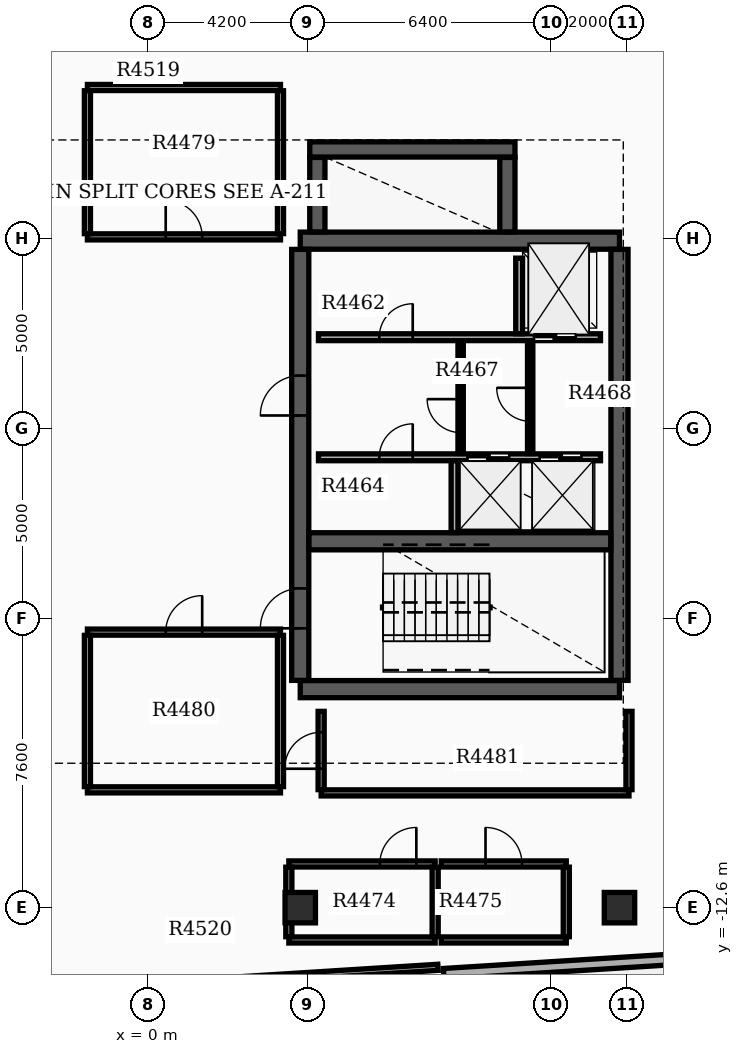
"""IFC4 building model, lengths in metres.
Left out: names, types, materials, properties, quantities, classifications, styles, units other than length and angle.
Written with IfcOpenShell. Run it as: python <this file> out.ifc"""

import sys

from ifc_helpers import new_model, si_unit, direction, frame, frame_2d, origin, origin_2d, place, context, subcontext, project, spatial, rectangle, extrude, element, fill, save


model = new_model("IFC4")
c1 = context("Model", 3, precision=1e-05, world=origin(), true_north=direction((0.0, 1.0)))
c2 = subcontext(c1, "Body", "Model", "MODEL_VIEW")
j1 = project(units=[si_unit("LENGTHUNIT", "METRE"), si_unit("PLANEANGLEUNIT", "RADIAN")], contexts=[c1])
p1 = place(None, origin())
s1 = spatial("IfcSite", under=j1, at=p1, CompositionType="ELEMENT")
p2 = place(p1, origin())
s2 = spatial("IfcBuilding", under=s1, at=p2, CompositionType="ELEMENT")
p3 = place(p2, frame((0.0, 0.0, 281.1)))
s3 = spatial("IfcBuildingStorey", under=s2, at=p3, CompositionType="ELEMENT", Elevation=281.1)
for number, where, z_axis, x_axis in (
    (1, (4.0, -6.85, 0.0), (0.0, 0.0, 1.0), (1.0, 0.0, 0.0)),
    (2, (4.0, 4.95, 0.0), (0.0, 0.0, 1.0), (1.0, 0.0, 0.0)),
):
    element("IfcWall", number, at=place(p3, frame(where, z_axis=z_axis, x_axis=x_axis)), inside=s3, PredefinedType="SHEAR", context=c2, shape_type="SweptSolid", body=[
        extrude(rectangle(XDim=8.4, YDim=0.45, at=frame_2d((4.2, 0.0))), origin(), (0.0, 0.0, 1.0), 3.7),
    ])
p4 = place(p3, frame((4.0, -6.62, 0.0), z_axis=(0.0, 0.0, 1.0), x_axis=(0.0, 1.0, 0.0)))
e3 = element("IfcWall", 3, at=p4, inside=s3, PredefinedType="SHEAR", context=c2, shape_type="SweptSolid", body=[
    extrude(rectangle(XDim=11.34, YDim=0.45, at=frame_2d((5.67, 0.0))), origin(), (0.0, 0.0, 1.0), 3.7),
])
p5 = place(p4, frame((1.37, 0.0, 0.0)))
e4 = element("IfcOpeningElement", 4, at=p5, cuts=e3, PredefinedType="OPENING", context=c2, shape_type="SweptSolid", body=[
    extrude(rectangle(XDim=1.05, YDim=2.15, at=frame_2d((0.525, 1.075))), frame((0.0, 0.235, 0.0), z_axis=(0.0, -1.0, 0.0), x_axis=(1.0, 0.0, 0.0)), (0.0, 0.0, 1.0), 0.47),
])
p6 = place(p4, frame((6.97, 0.0, 0.0)))
e5 = element("IfcOpeningElement", 5, at=p6, cuts=e3, PredefinedType="OPENING", context=c2, shape_type="SweptSolid", body=[
    extrude(rectangle(XDim=1.05, YDim=2.15, at=frame_2d((0.525, 1.075))), frame((0.0, 0.235, 0.0), z_axis=(0.0, -1.0, 0.0), x_axis=(1.0, 0.0, 0.0)), (0.0, 0.0, 1.0), 0.47),
])
p7 = place(p3, frame((12.4, -6.62, 0.0), z_axis=(0.0, 0.0, 1.0), x_axis=(0.0, 1.0, 0.0)))
e6 = element("IfcWall", 6, at=p7, inside=s3, PredefinedType="SHEAR", context=c2, shape_type="SweptSolid", body=[
    extrude(rectangle(XDim=11.34, YDim=0.45, at=frame_2d((5.67, 0.0))), origin(), (0.0, 0.0, 1.0), 3.7),
])
p8 = place(p3, frame((4.23, -2.96, 0.0), z_axis=(0.0, 0.0, 1.0), x_axis=(1.0, 0.0, 0.0)))
e7 = element("IfcWall", 7, at=p8, inside=s3, PredefinedType="SHEAR", context=c2, shape_type="SweptSolid", body=[
    extrude(rectangle(XDim=7.94, YDim=0.45, at=frame_2d((3.97, 0.0))), origin(), (0.0, 0.0, 1.0), 3.7),
])
p9 = place(p3, frame((4.45, 5.18, 0.0), z_axis=(0.0, 0.0, 1.0), x_axis=(0.0, 1.0, 0.0)))
e8 = element("IfcWall", 8, at=p9, inside=s3, PredefinedType="SHEAR", context=c2, shape_type="SweptSolid", body=[
    extrude(rectangle(XDim=1.96, YDim=0.4, at=frame_2d((0.98, 0.0))), origin(), (0.0, 0.0, 1.0), 3.7),
])
p10 = place(p3, frame((4.25, 7.35, 0.0), z_axis=(0.0, 0.0, 1.0), x_axis=(1.0, 0.0, 0.0)))
e9 = element("IfcWall", 9, at=p10, inside=s3, PredefinedType="SHEAR", context=c2, shape_type="SweptSolid", body=[
    extrude(rectangle(XDim=5.4, YDim=0.4, at=frame_2d((2.7, 0.0))), origin(), (0.0, 0.0, 1.0), 3.7),
])
p11 = place(p3, frame((9.45, 5.18, 0.0), z_axis=(0.0, 0.0, 1.0), x_axis=(0.0, 1.0, 0.0)))
e10 = element("IfcWall", 10, at=p11, inside=s3, PredefinedType="SHEAR", context=c2, shape_type="SweptSolid", body=[
    extrude(rectangle(XDim=1.96, YDim=0.4, at=frame_2d((0.98, 0.0))), origin(), (0.0, 0.0, 1.0), 3.7),
])
for number, where, z_axis, x_axis in (
    (11, (12.4, -12.6, 0.0), (0.0, 0.0, 1.0), (1.0, 0.0, 0.0)),
    (12, (4.0, -12.6, 0.0), (0.0, 0.0, 1.0), (1.0, 0.0, 0.0)),
):
    element("IfcColumn", number, at=place(p3, frame(where, z_axis=z_axis, x_axis=x_axis)), inside=s3, PredefinedType="COLUMN", context=c2, shape_type="SweptSolid", body=[
        extrude(rectangle(XDim=0.8, YDim=0.8, at=origin_2d()), origin(), (0.0, 0.0, 1.0), 3.9),
    ])
p12 = place(p3, frame((14.063, -13.945, 0.0), z_axis=(0.0, 0.0, 1.0), x_axis=(-0.998027314704, -0.062781200242, 0.0)))
e13 = element("IfcWall", 13, at=p12, inside=s3, PredefinedType="STANDARD", context=c2, shape_type="SweptSolid", body=[
    extrude(rectangle(XDim=6.3, YDim=0.28, at=frame_2d((3.15, 0.0))), origin(), (0.0, 0.0, 1.0), 3.18),
])
p13 = place(p3, frame((4.48, 2.41, 0.0), z_axis=(0.0, 0.0, 1.0), x_axis=(1.0, 0.0, 0.0)))
e14 = element("IfcWall", 14, at=p13, inside=s3, PredefinedType="SOLIDWALL", context=c2, shape_type="SweptSolid", body=[
    extrude(rectangle(XDim=7.42, YDim=0.18, at=frame_2d((3.71, 0.0))), origin(), (0.0, 0.0, 1.0), 3.17),
])
p14 = place(p13, frame((5.67, 0.0, 0.0)))
e15 = element("IfcOpeningElement", 15, at=p14, cuts=e14, PredefinedType="OPENING", context=c2, shape_type="SweptSolid", body=[
    extrude(rectangle(XDim=1.1, YDim=2.15, at=frame_2d((0.55, 1.075))), frame((0.0, 0.1, 0.0), z_axis=(0.0, -1.0, 0.0), x_axis=(1.0, 0.0, 0.0)), (0.0, 0.0, 1.0), 0.2),
])
p15 = place(p13, frame((1.6, 0.0, 0.0)))
e16 = element("IfcOpeningElement", 16, at=p15, cuts=e14, PredefinedType="OPENING", context=c2, shape_type="SweptSolid", body=[
    extrude(rectangle(XDim=0.88, YDim=2.1, at=frame_2d((0.44, 1.05))), frame((0.0, 0.1, 0.0), z_axis=(0.0, -1.0, 0.0), x_axis=(1.0, 0.0, 0.0)), (0.0, 0.0, 1.0), 0.2),
])
p16 = place(p3, frame((4.48, -0.75, 0.0), z_axis=(0.0, 0.0, 1.0), x_axis=(1.0, 0.0, 0.0)))
e17 = element("IfcWall", 17, at=p16, inside=s3, PredefinedType="SOLIDWALL", context=c2, shape_type="SweptSolid", body=[
    extrude(rectangle(XDim=7.42, YDim=0.18, at=frame_2d((3.71, 0.0))), origin(), (0.0, 0.0, 1.0), 3.17),
])
p17 = place(p16, frame((3.92, 0.0, 0.0)))
e18 = element("IfcOpeningElement", 18, at=p17, cuts=e17, PredefinedType="OPENING", context=c2, shape_type="SweptSolid", body=[
    extrude(rectangle(XDim=1.1, YDim=2.15, at=frame_2d((0.55, 1.075))), frame((0.0, 0.1, 0.0), z_axis=(0.0, -1.0, 0.0), x_axis=(1.0, 0.0, 0.0)), (0.0, 0.0, 1.0), 0.2),
])
p18 = place(p16, frame((5.82, 0.0, 0.0)))
e19 = element("IfcOpeningElement", 19, at=p18, cuts=e17, PredefinedType="OPENING", context=c2, shape_type="SweptSolid", body=[
    extrude(rectangle(XDim=1.1, YDim=2.15, at=frame_2d((0.55, 1.075))), frame((0.0, 0.1, 0.0), z_axis=(0.0, -1.0, 0.0), x_axis=(1.0, 0.0, 0.0)), (0.0, 0.0, 1.0), 0.2),
])
p19 = place(p16, frame((1.6, 0.0, 0.0)))
e20 = element("IfcOpeningElement", 20, at=p19, cuts=e17, PredefinedType="OPENING", context=c2, shape_type="SweptSolid", body=[
    extrude(rectangle(XDim=0.88, YDim=2.1, at=frame_2d((0.44, 1.05))), frame((0.0, 0.1, 0.0), z_axis=(0.0, -1.0, 0.0), x_axis=(1.0, 0.0, 0.0)), (0.0, 0.0, 1.0), 0.2),
])
p20 = place(p3, frame((9.76, 2.5, 0.0), z_axis=(0.0, 0.0, 1.0), x_axis=(0.0, 1.0, 0.0)))
e21 = element("IfcWall", 21, at=p20, inside=s3, PredefinedType="SOLIDWALL", context=c2, shape_type="SweptSolid", body=[
    extrude(rectangle(XDim=1.99, YDim=0.18, at=frame_2d((0.995, 0.0))), origin(), (0.0, 0.0, 1.0), 3.17),
])
p21 = place(p3, frame((8.06, -2.73, 0.0), z_axis=(0.0, 0.0, 1.0), x_axis=(0.0, 1.0, 0.0)))
e22 = element("IfcWall", 22, at=p21, inside=s3, PredefinedType="SOLIDWALL", context=c2, shape_type="SweptSolid", body=[
    extrude(rectangle(XDim=1.89, YDim=0.18, at=frame_2d((0.945, 0.0))), origin(), (0.0, 0.0, 1.0), 3.17),
])
p22 = place(p3, frame((8.22, -0.65, 0.0), z_axis=(0.0, 0.0, 1.0), x_axis=(0.0, 1.0, 0.0)))
e23 = element("IfcWall", 23, at=p22, inside=s3, PredefinedType="SOLIDWALL", context=c2, shape_type="SweptSolid", body=[
    extrude(rectangle(XDim=2.96, YDim=0.14, at=frame_2d((1.48, 0.0))), origin(), (0.0, 0.0, 1.0), 3.17),
])
p23 = place(p22, frame((0.55, 0.0, 0.0)))
e24 = element("IfcOpeningElement", 24, at=p23, cuts=e23, PredefinedType="OPENING", context=c2, shape_type="SweptSolid", body=[
    extrude(rectangle(XDim=0.88, YDim=2.1, at=frame_2d((0.44, 1.05))), frame((0.0, 0.08, 0.0), z_axis=(0.0, -1.0, 0.0), x_axis=(1.0, 0.0, 0.0)), (0.0, 0.0, 1.0), 0.16),
])
p24 = place(p3, frame((10.05, -0.652, 0.0), z_axis=(0.0, 0.0, 1.0), x_axis=(0.0, 1.0, 0.0)))
e25 = element("IfcWall", 25, at=p24, inside=s3, PredefinedType="PARTITIONING", context=c2, shape_type="SweptSolid", body=[
    extrude(rectangle(XDim=2.962, YDim=0.14, at=frame_2d((1.481, 0.0))), origin(), (0.0, 0.0, 1.0), 3.17),
])
p25 = place(p24, frame((0.85, 0.0, 0.0)))
e26 = element("IfcOpeningElement", 26, at=p25, cuts=e25, PredefinedType="OPENING", context=c2, shape_type="SweptSolid", body=[
    extrude(rectangle(XDim=0.88, YDim=2.1, at=frame_2d((0.44, 1.05))), frame((0.0, 0.08, 0.0), z_axis=(0.0, -1.0, 0.0), x_axis=(1.0, 0.0, 0.0)), (0.0, 0.0, 1.0), 0.16),
])
p26 = place(p3, frame((3.7, -13.45, 0.0), z_axis=(0.0, 0.0, 1.0), x_axis=(1.0, 0.0, 0.0)))
e27 = element("IfcWall", 27, at=p26, inside=s3, PredefinedType="PARTITIONING", context=c2, shape_type="SweptSolid", body=[
    extrude(rectangle(XDim=3.85, YDim=0.16, at=frame_2d((1.925, 0.0))), origin(), (0.0, 0.0, 1.0), 3.17),
])
p27 = place(p3, frame((3.7, -11.45, 0.0), z_axis=(0.0, 0.0, 1.0), x_axis=(1.0, 0.0, 0.0)))
e28 = element("IfcWall", 28, at=p27, inside=s3, PredefinedType="PARTITIONING", context=c2, shape_type="SweptSolid", body=[
    extrude(rectangle(XDim=3.85, YDim=0.16, at=frame_2d((1.925, 0.0))), origin(), (0.0, 0.0, 1.0), 3.17),
])
p28 = place(p27, frame((2.395, 0.0, 0.0)))
e29 = element("IfcOpeningElement", 29, at=p28, cuts=e28, PredefinedType="OPENING", context=c2, shape_type="SweptSolid", body=[
    extrude(rectangle(XDim=0.96, YDim=2.15, at=frame_2d((0.48, 1.075))), frame((0.0, 0.09, 0.0), z_axis=(0.0, -1.0, 0.0), x_axis=(1.0, 0.0, 0.0)), (0.0, 0.0, 1.0), 0.18),
])
for number, where, z_axis, x_axis in (
    (30, (3.7, -13.365, 0.0), (0.0, 0.0, 1.0), (0.0, 1.0, 0.0)),
    (31, (7.55, -13.365, 0.0), (0.0, 0.0, 1.0), (0.0, 1.0, 0.0)),
):
    element("IfcWall", number, at=place(p3, frame(where, z_axis=z_axis, x_axis=x_axis)), inside=s3, PredefinedType="PARTITIONING", context=c2, shape_type="SweptSolid", body=[
        extrude(rectangle(XDim=1.83, YDim=0.16, at=frame_2d((0.915, 0.0))), origin(), (0.0, 0.0, 1.0), 3.17),
    ])
p29 = place(p3, frame((7.71, -13.45, 0.0), z_axis=(0.0, 0.0, 1.0), x_axis=(1.0, 0.0, 0.0)))
e32 = element("IfcWall", 32, at=p29, inside=s3, PredefinedType="PARTITIONING", context=c2, shape_type="SweptSolid", body=[
    extrude(rectangle(XDim=3.29, YDim=0.16, at=frame_2d((1.645, 0.0))), origin(), (0.0, 0.0, 1.0), 3.17),
])
p30 = place(p3, frame((7.71, -11.45, 0.0), z_axis=(0.0, 0.0, 1.0), x_axis=(1.0, 0.0, 0.0)))
e33 = element("IfcWall", 33, at=p30, inside=s3, PredefinedType="PARTITIONING", context=c2, shape_type="SweptSolid", body=[
    extrude(rectangle(XDim=3.29, YDim=0.16, at=frame_2d((1.645, 0.0))), origin(), (0.0, 0.0, 1.0), 3.17),
])
p31 = place(p30, frame((1.165, 0.0, 0.0)))
e34 = element("IfcOpeningElement", 34, at=p31, cuts=e33, PredefinedType="OPENING", context=c2, shape_type="SweptSolid", body=[
    extrude(rectangle(XDim=0.96, YDim=2.15, at=frame_2d((0.48, 1.075))), frame((0.0, 0.09, 0.0), z_axis=(0.0, -1.0, 0.0), x_axis=(1.0, 0.0, 0.0)), (0.0, 0.0, 1.0), 0.18),
])
p32 = place(p3, frame((11.0, -13.365, 0.0), z_axis=(0.0, 0.0, 1.0), x_axis=(0.0, 1.0, 0.0)))
e35 = element("IfcWall", 35, at=p32, inside=s3, PredefinedType="PARTITIONING", context=c2, shape_type="SweptSolid", body=[
    extrude(rectangle(XDim=1.83, YDim=0.16, at=frame_2d((0.915, 0.0))), origin(), (0.0, 0.0, 1.0), 3.17),
])
p33 = place(p3, frame((-1.6, 5.05, 0.0), z_axis=(0.0, 0.0, 1.0), x_axis=(1.0, 0.0, 0.0)))
e36 = element("IfcWall", 36, at=p33, inside=s3, PredefinedType="PARTITIONING", context=c2, shape_type="SweptSolid", body=[
    extrude(rectangle(XDim=5.08, YDim=0.16, at=frame_2d((2.54, 0.0))), origin(), (0.0, 0.0, 1.0), 3.17),
])
p34 = place(p33, frame((2.06, 0.0, 0.0)))
e37 = element("IfcOpeningElement", 37, at=p34, cuts=e36, PredefinedType="OPENING", context=c2, shape_type="SweptSolid", body=[
    extrude(rectangle(XDim=0.96, YDim=2.15, at=frame_2d((0.48, 1.075))), frame((0.0, 0.09, 0.0), z_axis=(0.0, -1.0, 0.0), x_axis=(1.0, 0.0, 0.0)), (0.0, 0.0, 1.0), 0.18),
])
p35 = place(p3, frame((-1.6, 8.98, 0.0), z_axis=(0.0, 0.0, 1.0), x_axis=(1.0, 0.0, 0.0)))
e38 = element("IfcWall", 38, at=p35, inside=s3, PredefinedType="PARTITIONING", context=c2, shape_type="SweptSolid", body=[
    extrude(rectangle(XDim=5.08, YDim=0.16, at=frame_2d((2.54, 0.0))), origin(), (0.0, 0.0, 1.0), 3.17),
])
for number, where, z_axis, x_axis in (
    (39, (-1.6, 5.135, 0.0), (0.0, 0.0, 1.0), (0.0, 1.0, 0.0)),
    (40, (3.48, 5.135, 0.0), (0.0, 0.0, 1.0), (0.0, 1.0, 0.0)),
):
    element("IfcWall", number, at=place(p3, frame(where, z_axis=z_axis, x_axis=x_axis)), inside=s3, PredefinedType="PARTITIONING", context=c2, shape_type="SweptSolid", body=[
        extrude(rectangle(XDim=3.76, YDim=0.16, at=frame_2d((1.88, 0.0))), origin(), (0.0, 0.0, 1.0), 3.17),
    ])
p36 = place(p3, frame((-1.6, -9.5, 0.0), z_axis=(0.0, 0.0, 1.0), x_axis=(1.0, 0.0, 0.0)))
e41 = element("IfcWall", 41, at=p36, inside=s3, PredefinedType="PARTITIONING", context=c2, shape_type="SweptSolid", body=[
    extrude(rectangle(XDim=5.08, YDim=0.16, at=frame_2d((2.54, 0.0))), origin(), (0.0, 0.0, 1.0), 3.17),
])
p37 = place(p3, frame((-1.6, -5.35, 0.0), z_axis=(0.0, 0.0, 1.0), x_axis=(1.0, 0.0, 0.0)))
e42 = element("IfcWall", 42, at=p37, inside=s3, PredefinedType="PARTITIONING", context=c2, shape_type="SweptSolid", body=[
    extrude(rectangle(XDim=5.08, YDim=0.16, at=frame_2d((2.54, 0.0))), origin(), (0.0, 0.0, 1.0), 3.17),
])
p38 = place(p37, frame((2.06, 0.0, 0.0)))
e43 = element("IfcOpeningElement", 43, at=p38, cuts=e42, PredefinedType="OPENING", context=c2, shape_type="SweptSolid", body=[
    extrude(rectangle(XDim=0.96, YDim=2.15, at=frame_2d((0.48, 1.075))), frame((0.0, 0.09, 0.0), z_axis=(0.0, -1.0, 0.0), x_axis=(1.0, 0.0, 0.0)), (0.0, 0.0, 1.0), 0.18),
])
for number, where, z_axis, x_axis in (
    (44, (-1.6, -9.415, 0.0), (0.0, 0.0, 1.0), (0.0, 1.0, 0.0)),
    (45, (3.48, -9.415, 0.0), (0.0, 0.0, 1.0), (0.0, 1.0, 0.0)),
):
    element("IfcWall", number, at=place(p3, frame(where, z_axis=z_axis, x_axis=x_axis)), inside=s3, PredefinedType="PARTITIONING", context=c2, shape_type="SweptSolid", body=[
        extrude(rectangle(XDim=3.98, YDim=0.16, at=frame_2d((1.99, 0.0))), origin(), (0.0, 0.0, 1.0), 3.17),
    ])
p39 = place(p3, frame((4.55, -9.58, 0.0), z_axis=(0.0, 0.0, 1.0), x_axis=(1.0, 0.0, 0.0)))
e46 = element("IfcWall", 46, at=p39, inside=s3, PredefinedType="PARTITIONING", context=c2, shape_type="SweptSolid", body=[
    extrude(rectangle(XDim=8.1, YDim=0.16, at=frame_2d((4.05, 0.0))), origin(), (0.0, 0.0, 1.0), 3.17),
])
p40 = place(p3, frame((4.55, -9.495, 0.0), z_axis=(0.0, 0.0, 1.0), x_axis=(0.0, 1.0, 0.0)))
e47 = element("IfcWall", 47, at=p40, inside=s3, PredefinedType="PARTITIONING", context=c2, shape_type="SweptSolid", body=[
    extrude(rectangle(XDim=2.06, YDim=0.16, at=frame_2d((1.03, 0.0))), origin(), (0.0, 0.0, 1.0), 3.17),
])
p41 = place(p40, frame((0.55, 0.0, 0.0)))
e48 = element("IfcOpeningElement", 48, at=p41, cuts=e47, PredefinedType="OPENING", context=c2, shape_type="SweptSolid", body=[
    extrude(rectangle(XDim=0.96, YDim=2.15, at=frame_2d((0.48, 1.075))), frame((0.0, 0.09, 0.0), z_axis=(0.0, -1.0, 0.0), x_axis=(1.0, 0.0, 0.0)), (0.0, 0.0, 1.0), 0.18),
])
p42 = place(p3, frame((12.65, -9.495, 0.0), z_axis=(0.0, 0.0, 1.0), x_axis=(0.0, 1.0, 0.0)))
e49 = element("IfcWall", 49, at=p42, inside=s3, PredefinedType="PARTITIONING", context=c2, shape_type="SweptSolid", body=[
    extrude(rectangle(XDim=2.06, YDim=0.16, at=frame_2d((1.03, 0.0))), origin(), (0.0, 0.0, 1.0), 3.17),
])
p43 = place(p3, frame((2.115, -14.516, 0.0), z_axis=(0.0, 0.0, 1.0), x_axis=(0.998025986639, 0.062802308829, 0.0)))
e50 = element("IfcWall", 50, at=p43, inside=s3, PredefinedType="PARTITIONING", context=c2, shape_type="SweptSolid", body=[
    extrude(rectangle(XDim=5.52, YDim=0.16, at=frame_2d((2.76, 0.0))), origin(), (0.0, 0.0, 1.0), 3.17),
])
p44 = place(p5, origin())
e51 = element("IfcDoor", 51, at=p44, inside=s3, OperationType="SINGLE_SWING_LEFT", PredefinedType="DOOR", context=c2, shape_type="SweptSolid", body=[
    extrude(rectangle(XDim=1.05, YDim=2.15, at=frame_2d((0.525, 1.075))), frame((0.0, 0.025, 0.0), z_axis=(0.0, -1.0, 0.0), x_axis=(1.0, 0.0, 0.0)), (0.0, 0.0, 1.0), 0.05),
])
fill(e4, e51)
p45 = place(p6, origin())
e52 = element("IfcDoor", 52, at=p45, inside=s3, OperationType="SINGLE_SWING_LEFT", PredefinedType="DOOR", context=c2, shape_type="SweptSolid", body=[
    extrude(rectangle(XDim=1.05, YDim=2.15, at=frame_2d((0.525, 1.075))), frame((0.0, 0.025, 0.0), z_axis=(0.0, -1.0, 0.0), x_axis=(1.0, 0.0, 0.0)), (0.0, 0.0, 1.0), 0.05),
])
fill(e5, e52)
p46 = place(p14, origin())
e53 = element("IfcDoor", 53, at=p46, inside=s3, OperationType="DOUBLE_DOOR_SLIDING", PredefinedType="DOOR", context=c2, shape_type="SweptSolid", body=[
    extrude(rectangle(XDim=1.1, YDim=2.15, at=frame_2d((0.55, 1.075))), frame((0.0, 0.025, 0.0), z_axis=(0.0, -1.0, 0.0), x_axis=(1.0, 0.0, 0.0)), (0.0, 0.0, 1.0), 0.05),
])
fill(e15, e53)
p47 = place(p17, origin())
e54 = element("IfcDoor", 54, at=p47, inside=s3, OperationType="DOUBLE_DOOR_SLIDING", PredefinedType="DOOR", context=c2, shape_type="SweptSolid", body=[
    extrude(rectangle(XDim=1.1, YDim=2.15, at=frame_2d((0.55, 1.075))), frame((0.0, 0.025, 0.0), z_axis=(0.0, -1.0, 0.0), x_axis=(1.0, 0.0, 0.0)), (0.0, 0.0, 1.0), 0.05),
])
fill(e18, e54)
p48 = place(p18, origin())
e55 = element("IfcDoor", 55, at=p48, inside=s3, OperationType="DOUBLE_DOOR_SLIDING", PredefinedType="DOOR", context=c2, shape_type="SweptSolid", body=[
    extrude(rectangle(XDim=1.1, YDim=2.15, at=frame_2d((0.55, 1.075))), frame((0.0, 0.025, 0.0), z_axis=(0.0, -1.0, 0.0), x_axis=(1.0, 0.0, 0.0)), (0.0, 0.0, 1.0), 0.05),
])
fill(e19, e55)
p49 = place(p15, origin())
e56 = element("IfcDoor", 56, at=p49, inside=s3, OperationType="SINGLE_SWING_RIGHT", PredefinedType="DOOR", context=c2, shape_type="SweptSolid", body=[
    extrude(rectangle(XDim=0.88, YDim=2.1, at=frame_2d((0.44, 1.05))), frame((0.0, 0.025, 0.0), z_axis=(0.0, -1.0, 0.0), x_axis=(1.0, 0.0, 0.0)), (0.0, 0.0, 1.0), 0.05),
])
fill(e16, e56)
p50 = place(p19, origin())
e57 = element("IfcDoor", 57, at=p50, inside=s3, OperationType="SINGLE_SWING_RIGHT", PredefinedType="DOOR", context=c2, shape_type="SweptSolid", body=[
    extrude(rectangle(XDim=0.88, YDim=2.1, at=frame_2d((0.44, 1.05))), frame((0.0, 0.025, 0.0), z_axis=(0.0, -1.0, 0.0), x_axis=(1.0, 0.0, 0.0)), (0.0, 0.0, 1.0), 0.05),
])
fill(e20, e57)
p51 = place(p23, origin())
e58 = element("IfcDoor", 58, at=p51, inside=s3, OperationType="SINGLE_SWING_RIGHT", PredefinedType="DOOR", context=c2, shape_type="SweptSolid", body=[
    extrude(rectangle(XDim=0.88, YDim=2.1, at=frame_2d((0.44, 1.05))), frame((0.0, 0.025, 0.0), z_axis=(0.0, -1.0, 0.0), x_axis=(1.0, 0.0, 0.0)), (0.0, 0.0, 1.0), 0.05),
])
fill(e24, e58)
p52 = place(p25, origin())
e59 = element("IfcDoor", 59, at=p52, inside=s3, OperationType="SINGLE_SWING_RIGHT", PredefinedType="DOOR", context=c2, shape_type="SweptSolid", body=[
    extrude(rectangle(XDim=0.88, YDim=2.1, at=frame_2d((0.44, 1.05))), frame((0.0, 0.025, 0.0), z_axis=(0.0, -1.0, 0.0), x_axis=(1.0, 0.0, 0.0)), (0.0, 0.0, 1.0), 0.05),
])
fill(e26, e59)
p53 = place(p28, origin())
e60 = element("IfcDoor", 60, at=p53, inside=s3, OperationType="SINGLE_SWING_RIGHT", PredefinedType="DOOR", context=c2, shape_type="SweptSolid", body=[
    extrude(rectangle(XDim=0.96, YDim=2.15, at=frame_2d((0.48, 1.075))), frame((0.0, 0.025, 0.0), z_axis=(0.0, -1.0, 0.0), x_axis=(1.0, 0.0, 0.0)), (0.0, 0.0, 1.0), 0.05),
])
fill(e29, e60)
p54 = place(p31, origin())
e61 = element("IfcDoor", 61, at=p54, inside=s3, OperationType="SINGLE_SWING_LEFT", PredefinedType="DOOR", context=c2, shape_type="SweptSolid", body=[
    extrude(rectangle(XDim=0.96, YDim=2.15, at=frame_2d((0.48, 1.075))), frame((0.0, 0.025, 0.0), z_axis=(0.0, -1.0, 0.0), x_axis=(1.0, 0.0, 0.0)), (0.0, 0.0, 1.0), 0.05),
])
fill(e34, e61)
p55 = place(p34, origin())
e62 = element("IfcDoor", 62, at=p55, inside=s3, OperationType="SINGLE_SWING_LEFT", PredefinedType="DOOR", context=c2, shape_type="SweptSolid", body=[
    extrude(rectangle(XDim=0.96, YDim=2.15, at=frame_2d((0.48, 1.075))), frame((0.0, 0.025, 0.0), z_axis=(0.0, -1.0, 0.0), x_axis=(1.0, 0.0, 0.0)), (0.0, 0.0, 1.0), 0.05),
])
fill(e37, e62)
p56 = place(p38, origin())
e63 = element("IfcDoor", 63, at=p56, inside=s3, OperationType="SINGLE_SWING_RIGHT", PredefinedType="DOOR", context=c2, shape_type="SweptSolid", body=[
    extrude(rectangle(XDim=0.96, YDim=2.15, at=frame_2d((0.48, 1.075))), frame((0.0, 0.025, 0.0), z_axis=(0.0, -1.0, 0.0), x_axis=(1.0, 0.0, 0.0)), (0.0, 0.0, 1.0), 0.05),
])
fill(e43, e63)
p57 = place(p41, origin())
e64 = element("IfcDoor", 64, at=p57, inside=s3, OperationType="SINGLE_SWING_LEFT", PredefinedType="DOOR", context=c2, shape_type="SweptSolid", body=[
    extrude(rectangle(XDim=0.96, YDim=2.15, at=frame_2d((0.48, 1.075))), frame((0.0, 0.025, 0.0), z_axis=(0.0, -1.0, 0.0), x_axis=(1.0, 0.0, 0.0)), (0.0, 0.0, 1.0), 0.05),
])
fill(e48, e64)
save(model, sys.argv[1])
